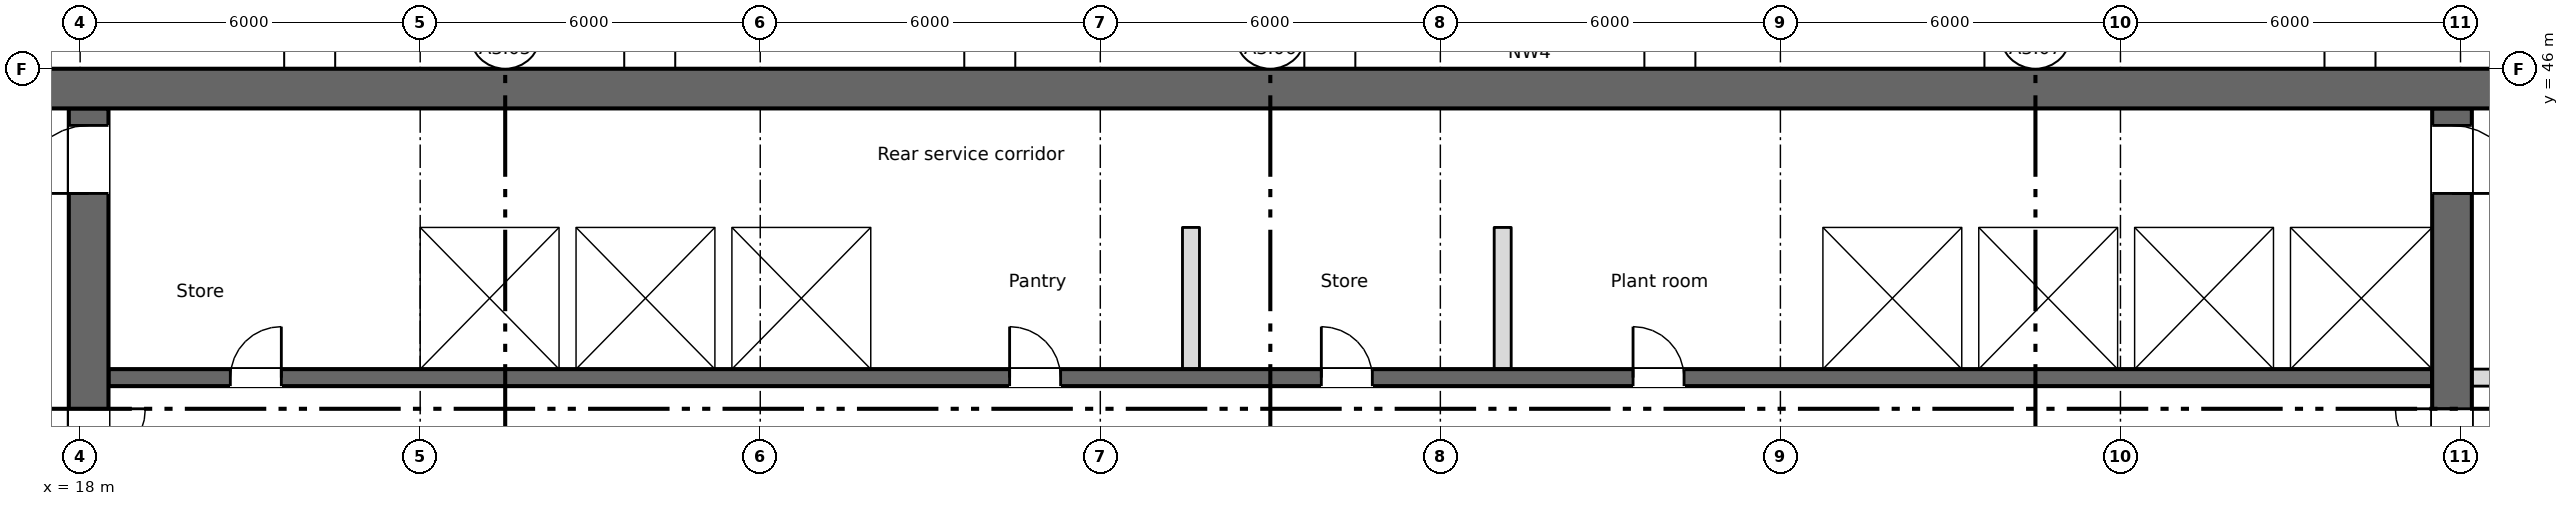
"""IFC4 building model, lengths in metres.
Left out: names, types, materials, properties, quantities, classifications, styles, units other than length and angle.
Written with IfcOpenShell. Run it as: python <this file> out.ifc"""

import sys

from ifc_helpers import new_model, si_unit, direction, frame, frame_2d, origin, place, context, subcontext, project, spatial, rectangle, extrude, element, fill, save


model = new_model("IFC4")
c1 = context("Model", 3, precision=1e-05, world=origin(), true_north=direction((0.0, 1.0)))
c2 = subcontext(c1, "Body", "Model", "MODEL_VIEW")
j1 = project(units=[si_unit("LENGTHUNIT", "METRE"), si_unit("PLANEANGLEUNIT", "RADIAN")], contexts=[c1])
p1 = place(None, origin())
s1 = spatial("IfcSite", under=j1, at=p1, CompositionType="ELEMENT")
p2 = place(p1, origin())
s2 = spatial("IfcBuilding", under=s1, at=p2, CompositionType="ELEMENT")
p3 = place(p2, frame((0.0, 0.0, 166.75)))
s3 = spatial("IfcBuildingStorey", under=s2, at=p3, CompositionType="ELEMENT", Elevation=166.75)
p4 = place(p3, frame((11.55, 45.65, 0.0), z_axis=(0.0, 0.0, 1.0), x_axis=(1.0, 0.0, 0.0)))
e1 = element("IfcWall", 1, at=p4, inside=s3, PredefinedType="SHEAR", context=c2, shape_type="SweptSolid", body=[
    extrude(rectangle(XDim=54.9, YDim=0.7, at=frame_2d((27.45, 0.0))), origin(), (0.0, 0.0, 1.0), 3.35),
])
p5 = place(p3, frame((18.15, 28.4, 0.0), z_axis=(0.0, 0.0, 1.0), x_axis=(0.0, 1.0, 0.0)))
e2 = element("IfcWall", 2, at=p5, inside=s3, PredefinedType="SHEAR", context=c2, shape_type="SweptSolid", body=[
    extrude(rectangle(XDim=16.9, YDim=0.7, at=frame_2d((8.45, 0.0))), origin(), (0.0, 0.0, 1.0), 3.35),
])
p6 = place(p5, frame((9.6, 0.0, 0.0)))
e3 = element("IfcOpeningElement", 3, at=p6, cuts=e2, PredefinedType="OPENING", context=c2, shape_type="SweptSolid", body=[
    extrude(rectangle(XDim=2.0, YDim=2.1, at=frame_2d((1.0, 1.05))), frame((0.0, 0.36, 0.0), z_axis=(0.0, -1.0, 0.0), x_axis=(1.0, 0.0, 0.0)), (0.0, 0.0, 1.0), 0.72),
])
p7 = place(p5, frame((15.4, 0.0, 0.0)))
e4 = element("IfcOpeningElement", 4, at=p7, cuts=e2, PredefinedType="OPENING", context=c2, shape_type="SweptSolid", body=[
    extrude(rectangle(XDim=1.2, YDim=2.1, at=frame_2d((0.6, 1.05))), frame((0.0, 0.36, 0.0), z_axis=(0.0, -1.0, 0.0), x_axis=(1.0, 0.0, 0.0)), (0.0, 0.0, 1.0), 0.72),
])
p8 = place(p3, frame((59.85, 28.4, 0.0), z_axis=(0.0, 0.0, 1.0), x_axis=(0.0, 1.0, 0.0)))
e5 = element("IfcWall", 5, at=p8, inside=s3, PredefinedType="SHEAR", context=c2, shape_type="SweptSolid", body=[
    extrude(rectangle(XDim=16.9, YDim=0.7, at=frame_2d((8.45, 0.0))), origin(), (0.0, 0.0, 1.0), 3.35),
])
p9 = place(p8, frame((9.6, 0.0, 0.0)))
e6 = element("IfcOpeningElement", 6, at=p9, cuts=e5, PredefinedType="OPENING", context=c2, shape_type="SweptSolid", body=[
    extrude(rectangle(XDim=2.0, YDim=2.1, at=frame_2d((1.0, 1.05))), frame((0.0, 0.36, 0.0), z_axis=(0.0, -1.0, 0.0), x_axis=(1.0, 0.0, 0.0)), (0.0, 0.0, 1.0), 0.72),
])
p10 = place(p8, frame((15.4, 0.0, 0.0)))
e7 = element("IfcOpeningElement", 7, at=p10, cuts=e5, PredefinedType="OPENING", context=c2, shape_type="SweptSolid", body=[
    extrude(rectangle(XDim=1.2, YDim=2.1, at=frame_2d((0.6, 1.05))), frame((0.0, 0.36, 0.0), z_axis=(0.0, -1.0, 0.0), x_axis=(1.0, 0.0, 0.0)), (0.0, 0.0, 1.0), 0.72),
])
p11 = place(p3, frame((18.5, 40.55, 0.0), z_axis=(0.0, 0.0, 1.0), x_axis=(1.0, 0.0, 0.0)))
e8 = element("IfcWall", 8, at=p11, inside=s3, PredefinedType="SHEAR", context=c2, shape_type="SweptSolid", body=[
    extrude(rectangle(XDim=41.0, YDim=0.3, at=frame_2d((20.5, 0.0))), origin(), (0.0, 0.0, 1.0), 3.35),
])
p12 = place(p11, frame((2.15, 0.0, 0.0)))
e9 = element("IfcOpeningElement", 9, at=p12, cuts=e8, PredefinedType="OPENING", context=c2, shape_type="SweptSolid", body=[
    extrude(rectangle(XDim=0.9, YDim=2.1, at=frame_2d((0.45, 1.05))), frame((0.0, 0.16, 0.0), z_axis=(0.0, -1.0, 0.0), x_axis=(1.0, 0.0, 0.0)), (0.0, 0.0, 1.0), 0.32),
])
p13 = place(p11, frame((15.9, 0.0, 0.0)))
e10 = element("IfcOpeningElement", 10, at=p13, cuts=e8, PredefinedType="OPENING", context=c2, shape_type="SweptSolid", body=[
    extrude(rectangle(XDim=0.9, YDim=2.1, at=frame_2d((0.45, 1.05))), frame((0.0, 0.16, 0.0), z_axis=(0.0, -1.0, 0.0), x_axis=(1.0, 0.0, 0.0)), (0.0, 0.0, 1.0), 0.32),
])
p14 = place(p11, frame((21.4, 0.0, 0.0)))
e11 = element("IfcOpeningElement", 11, at=p14, cuts=e8, PredefinedType="OPENING", context=c2, shape_type="SweptSolid", body=[
    extrude(rectangle(XDim=0.9, YDim=2.1, at=frame_2d((0.45, 1.05))), frame((0.0, 0.16, 0.0), z_axis=(0.0, -1.0, 0.0), x_axis=(1.0, 0.0, 0.0)), (0.0, 0.0, 1.0), 0.32),
])
p15 = place(p11, frame((26.9, 0.0, 0.0)))
e12 = element("IfcOpeningElement", 12, at=p15, cuts=e8, PredefinedType="OPENING", context=c2, shape_type="SweptSolid", body=[
    extrude(rectangle(XDim=0.9, YDim=2.1, at=frame_2d((0.45, 1.05))), frame((0.0, 0.16, 0.0), z_axis=(0.0, -1.0, 0.0), x_axis=(1.0, 0.0, 0.0)), (0.0, 0.0, 1.0), 0.32),
])
p16 = place(p11, frame((6.175, 0.0, 0.0)))
e13 = element("IfcOpeningElement", 13, at=p16, cuts=e8, PredefinedType="OPENING", context=c2, shape_type="SweptSolid", body=[
    extrude(rectangle(XDim=1.1, YDim=2.1, at=frame_2d((0.55, 1.05))), frame((0.0, 0.16, 0.0), z_axis=(0.0, -1.0, 0.0), x_axis=(1.0, 0.0, 0.0)), (0.0, 0.0, 1.0), 0.32),
])
p17 = place(p11, frame((8.925, 0.0, 0.0)))
e14 = element("IfcOpeningElement", 14, at=p17, cuts=e8, PredefinedType="OPENING", context=c2, shape_type="SweptSolid", body=[
    extrude(rectangle(XDim=1.1, YDim=2.1, at=frame_2d((0.55, 1.05))), frame((0.0, 0.16, 0.0), z_axis=(0.0, -1.0, 0.0), x_axis=(1.0, 0.0, 0.0)), (0.0, 0.0, 1.0), 0.32),
])
p18 = place(p11, frame((11.675, 0.0, 0.0)))
e15 = element("IfcOpeningElement", 15, at=p18, cuts=e8, PredefinedType="OPENING", context=c2, shape_type="SweptSolid", body=[
    extrude(rectangle(XDim=1.1, YDim=2.1, at=frame_2d((0.55, 1.05))), frame((0.0, 0.16, 0.0), z_axis=(0.0, -1.0, 0.0), x_axis=(1.0, 0.0, 0.0)), (0.0, 0.0, 1.0), 0.32),
])
p19 = place(p11, frame((30.925, 0.0, 0.0)))
e16 = element("IfcOpeningElement", 16, at=p19, cuts=e8, PredefinedType="OPENING", context=c2, shape_type="SweptSolid", body=[
    extrude(rectangle(XDim=1.1, YDim=2.1, at=frame_2d((0.55, 1.05))), frame((0.0, 0.16, 0.0), z_axis=(0.0, -1.0, 0.0), x_axis=(1.0, 0.0, 0.0)), (0.0, 0.0, 1.0), 0.32),
])
p20 = place(p11, frame((33.675, 0.0, 0.0)))
e17 = element("IfcOpeningElement", 17, at=p20, cuts=e8, PredefinedType="OPENING", context=c2, shape_type="SweptSolid", body=[
    extrude(rectangle(XDim=1.1, YDim=2.1, at=frame_2d((0.55, 1.05))), frame((0.0, 0.16, 0.0), z_axis=(0.0, -1.0, 0.0), x_axis=(1.0, 0.0, 0.0)), (0.0, 0.0, 1.0), 0.32),
])
p21 = place(p11, frame((36.375, 0.0, 0.0)))
e18 = element("IfcOpeningElement", 18, at=p21, cuts=e8, PredefinedType="OPENING", context=c2, shape_type="SweptSolid", body=[
    extrude(rectangle(XDim=1.2, YDim=2.1, at=frame_2d((0.6, 1.05))), frame((0.0, 0.16, 0.0), z_axis=(0.0, -1.0, 0.0), x_axis=(1.0, 0.0, 0.0)), (0.0, 0.0, 1.0), 0.32),
])
p22 = place(p11, frame((39.15, 0.0, 0.0)))
e19 = element("IfcOpeningElement", 19, at=p22, cuts=e8, PredefinedType="OPENING", context=c2, shape_type="SweptSolid", body=[
    extrude(rectangle(XDim=1.2, YDim=2.1, at=frame_2d((0.6, 1.05))), frame((0.0, 0.16, 0.0), z_axis=(0.0, -1.0, 0.0), x_axis=(1.0, 0.0, 0.0)), (0.0, 0.0, 1.0), 0.32),
])
p23 = place(p3, frame((18.5, 43.35, 0.0), z_axis=(0.0, 0.0, 1.0), x_axis=(1.0, 0.0, 0.0)))
e20 = element("IfcWall", 20, at=p23, inside=s3, PredefinedType="SHEAR", context=c2, shape_type="SweptSolid", body=[
    extrude(rectangle(XDim=41.0, YDim=0.3, at=frame_2d((20.5, 0.0))), origin(), (0.0, 0.0, 1.0), 3.35),
])
p24 = place(p3, frame((60.2, 40.55, 0.0), z_axis=(0.0, 0.0, 1.0), x_axis=(1.0, 0.0, 0.0)))
e21 = element("IfcWall", 21, at=p24, inside=s3, PredefinedType="PARTITIONING", context=c2, shape_type="SweptSolid", body=[
    extrude(rectangle(XDim=2.5, YDim=0.3, at=frame_2d((1.25, 0.0))), origin(), (0.0, 0.0, 1.0), 3.35),
])
p25 = place(p24, frame((0.725, 0.0, 0.0)))
e22 = element("IfcOpeningElement", 22, at=p25, cuts=e21, PredefinedType="OPENING", context=c2, shape_type="SweptSolid", body=[
    extrude(rectangle(XDim=0.9, YDim=2.1, at=frame_2d((0.45, 1.05))), frame((0.0, 0.16, 0.0), z_axis=(0.0, -1.0, 0.0), x_axis=(1.0, 0.0, 0.0)), (0.0, 0.0, 1.0), 0.32),
])
for number, where, z_axis, x_axis in (
    (23, (23.85, 40.7, 0.0), (0.0, 0.0, 1.0), (0.0, 1.0, 0.0)),
    (24, (26.6, 40.7, 0.0), (0.0, 0.0, 1.0), (0.0, 1.0, 0.0)),
    (25, (29.35, 40.7, 0.0), (0.0, 0.0, 1.0), (0.0, 1.0, 0.0)),
    (26, (32.1, 40.7, 0.0), (0.0, 0.0, 1.0), (0.0, 1.0, 0.0)),
    (27, (48.6, 40.7, 0.0), (0.0, 0.0, 1.0), (0.0, 1.0, 0.0)),
    (28, (51.35, 40.7, 0.0), (0.0, 0.0, 1.0), (0.0, 1.0, 0.0)),
    (29, (54.1, 40.7, 0.0), (0.0, 0.0, 1.0), (0.0, 1.0, 0.0)),
    (30, (56.85, 40.7, 0.0), (0.0, 0.0, 1.0), (0.0, 1.0, 0.0)),
):
    element("IfcWall", number, at=place(p3, frame(where, z_axis=z_axis, x_axis=x_axis)), inside=s3, PredefinedType="SHEAR", context=c2, shape_type="SweptSolid", body=[
        extrude(rectangle(XDim=2.5, YDim=0.3, at=frame_2d((1.25, 0.0))), origin(), (0.0, 0.0, 1.0), 3.35),
    ])
for number, where, z_axis, x_axis in (
    (31, (37.6, 40.7, 0.0), (0.0, 0.0, 1.0), (0.0, 1.0, 0.0)),
    (32, (43.1, 40.7, 0.0), (0.0, 0.0, 1.0), (0.0, 1.0, 0.0)),
):
    element("IfcWall", number, at=place(p3, frame(where, z_axis=z_axis, x_axis=x_axis)), inside=s3, PredefinedType="PARTITIONING", context=c2, shape_type="SweptSolid", body=[
        extrude(rectangle(XDim=2.5, YDim=0.3, at=frame_2d((1.25, 0.0))), origin(), (0.0, 0.0, 1.0), 3.35),
    ])
p26 = place(p12, origin())
e33 = element("IfcDoor", 33, at=p26, inside=s3, OperationType="SINGLE_SWING_RIGHT", PredefinedType="DOOR", context=c2, shape_type="SweptSolid", body=[
    extrude(rectangle(XDim=0.9, YDim=2.1, at=frame_2d((0.45, 1.05))), frame((0.0, 0.025, 0.0), z_axis=(0.0, -1.0, 0.0), x_axis=(1.0, 0.0, 0.0)), (0.0, 0.0, 1.0), 0.05),
])
fill(e9, e33)
p27 = place(p13, origin())
e34 = element("IfcDoor", 34, at=p27, inside=s3, OperationType="SINGLE_SWING_LEFT", PredefinedType="DOOR", context=c2, shape_type="SweptSolid", body=[
    extrude(rectangle(XDim=0.9, YDim=2.1, at=frame_2d((0.45, 1.05))), frame((0.0, 0.025, 0.0), z_axis=(0.0, -1.0, 0.0), x_axis=(1.0, 0.0, 0.0)), (0.0, 0.0, 1.0), 0.05),
])
fill(e10, e34)
p28 = place(p14, origin())
e35 = element("IfcDoor", 35, at=p28, inside=s3, OperationType="SINGLE_SWING_LEFT", PredefinedType="DOOR", context=c2, shape_type="SweptSolid", body=[
    extrude(rectangle(XDim=0.9, YDim=2.1, at=frame_2d((0.45, 1.05))), frame((0.0, 0.025, 0.0), z_axis=(0.0, -1.0, 0.0), x_axis=(1.0, 0.0, 0.0)), (0.0, 0.0, 1.0), 0.05),
])
fill(e11, e35)
p29 = place(p15, origin())
e36 = element("IfcDoor", 36, at=p29, inside=s3, OperationType="SINGLE_SWING_LEFT", PredefinedType="DOOR", context=c2, shape_type="SweptSolid", body=[
    extrude(rectangle(XDim=0.9, YDim=2.1, at=frame_2d((0.45, 1.05))), frame((0.0, 0.025, 0.0), z_axis=(0.0, -1.0, 0.0), x_axis=(1.0, 0.0, 0.0)), (0.0, 0.0, 1.0), 0.05),
])
fill(e12, e36)
p30 = place(p16, origin())
e37 = element("IfcDoor", 37, at=p30, inside=s3, OperationType="SLIDING_TO_LEFT", PredefinedType="DOOR", context=c2, shape_type="SweptSolid", body=[
    extrude(rectangle(XDim=1.1, YDim=2.1, at=frame_2d((0.55, 1.05))), frame((0.0, 0.025, 0.0), z_axis=(0.0, -1.0, 0.0), x_axis=(1.0, 0.0, 0.0)), (0.0, 0.0, 1.0), 0.05),
])
fill(e13, e37)
p31 = place(p17, origin())
e38 = element("IfcDoor", 38, at=p31, inside=s3, OperationType="SLIDING_TO_LEFT", PredefinedType="DOOR", context=c2, shape_type="SweptSolid", body=[
    extrude(rectangle(XDim=1.1, YDim=2.1, at=frame_2d((0.55, 1.05))), frame((0.0, 0.025, 0.0), z_axis=(0.0, -1.0, 0.0), x_axis=(1.0, 0.0, 0.0)), (0.0, 0.0, 1.0), 0.05),
])
fill(e14, e38)
p32 = place(p18, origin())
e39 = element("IfcDoor", 39, at=p32, inside=s3, OperationType="SLIDING_TO_LEFT", PredefinedType="DOOR", context=c2, shape_type="SweptSolid", body=[
    extrude(rectangle(XDim=1.1, YDim=2.1, at=frame_2d((0.55, 1.05))), frame((0.0, 0.025, 0.0), z_axis=(0.0, -1.0, 0.0), x_axis=(1.0, 0.0, 0.0)), (0.0, 0.0, 1.0), 0.05),
])
fill(e15, e39)
p33 = place(p19, origin())
e40 = element("IfcDoor", 40, at=p33, inside=s3, OperationType="SLIDING_TO_LEFT", PredefinedType="DOOR", context=c2, shape_type="SweptSolid", body=[
    extrude(rectangle(XDim=1.1, YDim=2.1, at=frame_2d((0.55, 1.05))), frame((0.0, 0.025, 0.0), z_axis=(0.0, -1.0, 0.0), x_axis=(1.0, 0.0, 0.0)), (0.0, 0.0, 1.0), 0.05),
])
fill(e16, e40)
p34 = place(p20, origin())
e41 = element("IfcDoor", 41, at=p34, inside=s3, OperationType="SLIDING_TO_LEFT", PredefinedType="DOOR", context=c2, shape_type="SweptSolid", body=[
    extrude(rectangle(XDim=1.1, YDim=2.1, at=frame_2d((0.55, 1.05))), frame((0.0, 0.025, 0.0), z_axis=(0.0, -1.0, 0.0), x_axis=(1.0, 0.0, 0.0)), (0.0, 0.0, 1.0), 0.05),
])
fill(e17, e41)
p35 = place(p21, origin())
e42 = element("IfcDoor", 42, at=p35, inside=s3, OperationType="SLIDING_TO_LEFT", PredefinedType="DOOR", context=c2, shape_type="SweptSolid", body=[
    extrude(rectangle(XDim=1.2, YDim=2.1, at=frame_2d((0.6, 1.05))), frame((0.0, 0.025, 0.0), z_axis=(0.0, -1.0, 0.0), x_axis=(1.0, 0.0, 0.0)), (0.0, 0.0, 1.0), 0.05),
])
fill(e18, e42)
p36 = place(p22, origin())
e43 = element("IfcDoor", 43, at=p36, inside=s3, OperationType="SLIDING_TO_LEFT", PredefinedType="DOOR", context=c2, shape_type="SweptSolid", body=[
    extrude(rectangle(XDim=1.2, YDim=2.1, at=frame_2d((0.6, 1.05))), frame((0.0, 0.025, 0.0), z_axis=(0.0, -1.0, 0.0), x_axis=(1.0, 0.0, 0.0)), (0.0, 0.0, 1.0), 0.05),
])
fill(e19, e43)
p37 = place(p6, origin())
e44 = element("IfcDoor", 44, at=p37, inside=s3, OperationType="DOUBLE_DOOR_SINGLE_SWING", PredefinedType="DOOR", context=c2, shape_type="SweptSolid", body=[
    extrude(rectangle(XDim=2.0, YDim=2.1, at=frame_2d((1.0, 1.05))), frame((0.0, 0.025, 0.0), z_axis=(0.0, -1.0, 0.0), x_axis=(1.0, 0.0, 0.0)), (0.0, 0.0, 1.0), 0.05),
])
fill(e3, e44)
p38 = place(p9, origin())
e45 = element("IfcDoor", 45, at=p38, inside=s3, OperationType="DOUBLE_DOOR_SINGLE_SWING", PredefinedType="DOOR", context=c2, shape_type="SweptSolid", body=[
    extrude(rectangle(XDim=2.0, YDim=2.1, at=frame_2d((1.0, 1.05))), frame((0.0, 0.025, 0.0), z_axis=(0.0, -1.0, 0.0), x_axis=(1.0, 0.0, 0.0)), (0.0, 0.0, 1.0), 0.05),
])
fill(e6, e45)
p39 = place(p7, origin())
e46 = element("IfcDoor", 46, at=p39, inside=s3, OperationType="SINGLE_SWING_LEFT", PredefinedType="DOOR", context=c2, shape_type="SweptSolid", body=[
    extrude(rectangle(XDim=1.2, YDim=2.1, at=frame_2d((0.6, 1.05))), frame((0.0, 0.025, 0.0), z_axis=(0.0, -1.0, 0.0), x_axis=(1.0, 0.0, 0.0)), (0.0, 0.0, 1.0), 0.05),
])
fill(e4, e46)
p40 = place(p10, origin())
e47 = element("IfcDoor", 47, at=p40, inside=s3, OperationType="SINGLE_SWING_LEFT", PredefinedType="DOOR", context=c2, shape_type="SweptSolid", body=[
    extrude(rectangle(XDim=1.2, YDim=2.1, at=frame_2d((0.6, 1.05))), frame((0.0, 0.025, 0.0), z_axis=(0.0, -1.0, 0.0), x_axis=(1.0, 0.0, 0.0)), (0.0, 0.0, 1.0), 0.05),
])
fill(e7, e47)
save(model, sys.argv[1])
